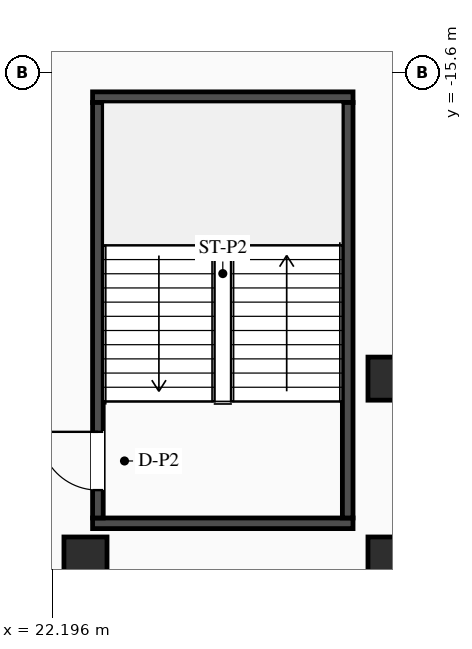
"""IFC4 building model, lengths in metres.
Left out: names, types, materials, properties, quantities, classifications, styles, units other than length and angle.
Written with IfcOpenShell. Run it as: python <this file> out.ifc"""

import sys

from ifc_helpers import new_model, si_unit, direction, frame, frame_2d, origin, origin_2d, place, context, subcontext, project, spatial, rectangle, i_section, extrude, element, fill, save


model = new_model("IFC4")
c1 = context("Model", 3, precision=1e-05, world=origin(), true_north=direction((0.0, 1.0)))
c2 = subcontext(c1, "Body", "Model", "MODEL_VIEW")
j1 = project(units=[si_unit("LENGTHUNIT", "METRE"), si_unit("PLANEANGLEUNIT", "RADIAN")], contexts=[c1])
p1 = place(None, origin())
s1 = spatial("IfcSite", under=j1, at=p1, CompositionType="ELEMENT")
p2 = place(p1, origin())
s2 = spatial("IfcBuilding", under=s1, at=p2, CompositionType="ELEMENT")
p3 = place(p2, frame((0.0, 0.0, 14.1)))
s3 = spatial("IfcBuildingStorey", under=s2, at=p3, CompositionType="ELEMENT", Elevation=14.1)
for number, where, z_axis, x_axis in (
    (1, (22.99, -24.505, 0.0), (0.0, 0.0, 1.0), (1.0, 0.0, 0.0)),
    (2, (22.99, -16.095, 0.0), (0.0, 0.0, 1.0), (1.0, 0.0, 0.0)),
):
    element("IfcWall", number, at=place(p3, frame(where, z_axis=z_axis, x_axis=x_axis)), inside=s3, PredefinedType="SHEAR", context=c2, shape_type="SweptSolid", body=[
        extrude(rectangle(XDim=5.14, YDim=0.21, at=frame_2d((2.57, 0.0))), origin(), (0.0, 0.0, 1.0), 4.25),
    ])
p4 = place(p3, frame((23.095, -24.4, 0.0), z_axis=(0.0, 0.0, 1.0), x_axis=(0.0, 1.0, 0.0)))
e3 = element("IfcWall", 3, at=p4, inside=s3, PredefinedType="SHEAR", context=c2, shape_type="SweptSolid", body=[
    extrude(rectangle(XDim=8.2, YDim=0.21, at=frame_2d((4.1, 0.0))), origin(), (0.0, 0.0, 1.0), 4.25),
])
p5 = place(p4, frame((0.55, 0.0, 0.0)))
e4 = element("IfcOpeningElement", 4, at=p5, cuts=e3, PredefinedType="OPENING", context=c2, shape_type="SweptSolid", body=[
    extrude(rectangle(XDim=1.15, YDim=2.1, at=frame_2d((0.575, 1.05))), frame((0.0, 0.115, 0.0), z_axis=(0.0, -1.0, 0.0), x_axis=(1.0, 0.0, 0.0)), (0.0, 0.0, 1.0), 0.23),
])
p6 = place(p3, frame((28.025, -24.4, 0.0), z_axis=(0.0, 0.0, 1.0), x_axis=(0.0, 1.0, 0.0)))
e5 = element("IfcWall", 5, at=p6, inside=s3, PredefinedType="SHEAR", context=c2, shape_type="SweptSolid", body=[
    extrude(rectangle(XDim=8.2, YDim=0.21, at=frame_2d((4.1, 0.0))), origin(), (0.0, 0.0, 1.0), 4.25),
])
for number, where, z_axis, x_axis in (
    (6, (28.85, -21.65, 0.0), (0.0, 0.0, 1.0), (1.0, 0.0, 0.0)),
    (7, (22.85, -25.2, 0.0), (0.0, 0.0, 1.0), (1.0, 0.0, 0.0)),
    (8, (28.85, -25.2, 0.0), (0.0, 0.0, 1.0), (1.0, 0.0, 0.0)),
):
    element("IfcColumn", number, at=place(p3, frame(where, z_axis=z_axis, x_axis=x_axis)), inside=s3, PredefinedType="COLUMN", context=c2, shape_type="SweptSolid", body=[
        extrude(i_section(OverallWidth=0.85, OverallDepth=0.85, WebThickness=0.032, FlangeThickness=0.048, at=origin_2d()), origin(), (0.0, 0.0, 1.0), 4.5),
    ])
p7 = place(p5, origin())
e9 = element("IfcDoor", 9, at=p7, inside=s3, OperationType="SINGLE_SWING_RIGHT", PredefinedType="DOOR", context=c2, shape_type="SweptSolid", body=[
    extrude(rectangle(XDim=1.15, YDim=2.1, at=frame_2d((0.575, 1.05))), frame((0.0, 0.025, 0.0), z_axis=(0.0, -1.0, 0.0), x_axis=(1.0, 0.0, 0.0)), (0.0, 0.0, 1.0), 0.05),
])
fill(e4, e9)
save(model, sys.argv[1])
